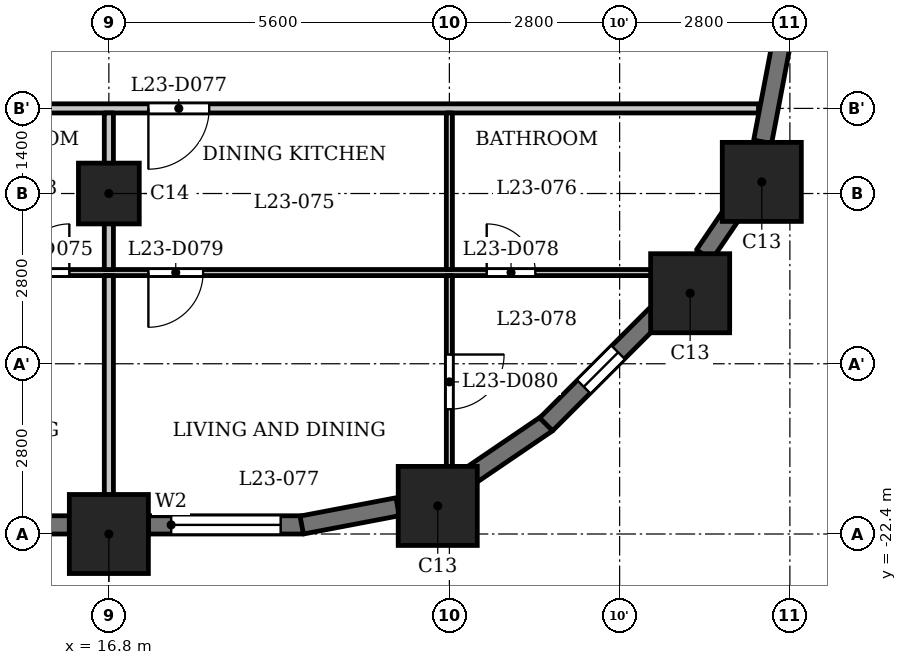
"""IFC4 building model, lengths in metres.
Left out: names, types, materials, properties, quantities, classifications, styles, units other than length and angle.
Written with IfcOpenShell. Run it as: python <this file> out.ifc"""

import sys

from ifc_helpers import new_model, si_unit, direction, frame, frame_2d, origin, origin_2d, place, context, subcontext, project, spatial, rectangle, extrude, element, fill, save


model = new_model("IFC4")
c1 = context("Model", 3, precision=1e-05, world=origin(), true_north=direction((0.0, 1.0)))
c2 = subcontext(c1, "Body", "Model", "MODEL_VIEW")
j1 = project(units=[si_unit("LENGTHUNIT", "METRE"), si_unit("PLANEANGLEUNIT", "RADIAN")], contexts=[c1])
p1 = place(None, origin())
s1 = spatial("IfcSite", under=j1, at=p1, CompositionType="ELEMENT")
p2 = place(p1, origin())
s2 = spatial("IfcBuilding", under=s1, at=p2, CompositionType="ELEMENT")
p3 = place(p2, frame((0.0, 0.0, 93.8)))
s3 = spatial("IfcBuildingStorey", under=s2, at=p3, CompositionType="ELEMENT", Elevation=93.8)
for number, where, z_axis, x_axis in (
    (1, (16.8, -22.4, 0.0), (0.0, 0.0, 1.0), (1.0, 0.0, 0.0)),
    (2, (22.209, -21.938, 0.0), (0.0, 0.0, 1.0), (1.0, 0.0, 0.0)),
    (3, (26.36, -18.44, 0.0), (0.0, 0.0, 1.0), (1.0, 0.0, 0.0)),
    (4, (27.538, -16.609, 0.0), (0.0, 0.0, 1.0), (1.0, 0.0, 0.0)),
):
    element("IfcColumn", number, at=place(p3, frame(where, z_axis=z_axis, x_axis=x_axis)), inside=s3, PredefinedType="COLUMN", context=c2, shape_type="SweptSolid", body=[
        extrude(rectangle(XDim=1.3, YDim=1.3, at=origin_2d()), origin(), (0.0, 0.0, 1.0), 3.5),
    ])
p4 = place(p3, frame((16.8, -16.8, 0.0), z_axis=(0.0, 0.0, 1.0), x_axis=(1.0, 0.0, 0.0)))
e5 = element("IfcColumn", 5, at=p4, inside=s3, PredefinedType="COLUMN", context=c2, shape_type="SweptSolid", body=[
    extrude(rectangle(XDim=1.0, YDim=1.0, at=origin_2d()), origin(), (0.0, 0.0, 1.0), 3.5),
])
p5 = place(p3, frame((11.85, -22.25, 0.0), z_axis=(0.0, 0.0, 1.0), x_axis=(1.0, 0.0, 0.0)))
e6 = element("IfcWall", 6, at=p5, inside=s3, PredefinedType="SOLIDWALL", context=c2, shape_type="SweptSolid", body=[
    extrude(rectangle(XDim=4.3, YDim=0.3, at=frame_2d((2.15, 0.0))), origin(), (0.0, 0.0, 1.0), 2.4),
])
p6 = place(p5, frame((0.35, 0.0, 1.2)))
e7 = element("IfcOpeningElement", 7, at=p6, cuts=e6, PredefinedType="OPENING", context=c2, shape_type="SweptSolid", body=[
    extrude(rectangle(XDim=3.6, YDim=0.95, at=frame_2d((1.8, 0.475))), frame((0.0, 0.16, 0.0), z_axis=(0.0, -1.0, 0.0), x_axis=(1.0, 0.0, 0.0)), (0.0, 0.0, 1.0), 0.32),
])
p7 = place(p3, frame((17.45, -22.25, 0.0), z_axis=(0.0, 0.0, 1.0), x_axis=(1.0, 0.0, 0.0)))
e8 = element("IfcWall", 8, at=p7, inside=s3, PredefinedType="SOLIDWALL", context=c2, shape_type="SweptSolid", body=[
    extrude(rectangle(XDim=2.55, YDim=0.3, at=frame_2d((1.275, 0.0))), origin(), (0.0, 0.0, 1.0), 2.4),
])
p8 = place(p7, frame((0.375, 0.0, 0.9)))
e9 = element("IfcOpeningElement", 9, at=p8, cuts=e8, PredefinedType="OPENING", context=c2, shape_type="SweptSolid", body=[
    extrude(rectangle(XDim=1.8, YDim=1.25, at=frame_2d((0.9, 0.625))), frame((0.0, 0.16, 0.0), z_axis=(0.0, -1.0, 0.0), x_axis=(1.0, 0.0, 0.0)), (0.0, 0.0, 1.0), 0.32),
])
for number, where, z_axis, x_axis in (
    (10, (19.972, -22.253, 0.0), (0.0, 0.0, 1.0), (0.982, 0.187, 0.0)),
    (11, (22.684, -21.482, 0.0), (0.0, 0.0, 1.0), (0.827, 0.562, 0.0)),
):
    element("IfcWall", number, at=place(p3, frame(where, z_axis=z_axis, x_axis=x_axis)), inside=s3, PredefinedType="SOLIDWALL", context=c2, shape_type="SweptSolid", body=[
        extrude(rectangle(XDim=1.606, YDim=0.3, at=frame_2d((0.803, 0.0))), origin(), (0.0, 0.0, 1.0), 2.4),
    ])
p9 = place(p3, frame((23.991, -20.597, 0.0), z_axis=(0.0, 0.0, 1.0), x_axis=(0.707106781187, 0.707106781187, 0.0)))
e12 = element("IfcWall", 12, at=p9, inside=s3, PredefinedType="SOLIDWALL", context=c2, shape_type="SweptSolid", body=[
    extrude(rectangle(XDim=2.55, YDim=0.3, at=frame_2d((1.275, 0.0))), origin(), (0.0, 0.0, 1.0), 2.4),
])
p10 = place(p9, frame((0.875, 0.0, 0.6)))
e13 = element("IfcOpeningElement", 13, at=p10, cuts=e12, PredefinedType="OPENING", context=c2, shape_type="SweptSolid", body=[
    extrude(rectangle(XDim=0.8, YDim=1.55, at=frame_2d((0.4, 0.775))), frame((0.0, 0.16, 0.0), z_axis=(0.0, -1.0, 0.0), x_axis=(1.0, 0.0, 0.0)), (0.0, 0.0, 1.0), 0.32),
])
p11 = place(p3, frame((26.589, -17.81, 0.0), z_axis=(0.0, 0.0, 1.0), x_axis=(0.562066330934, 0.827092159091, 0.0)))
e14 = element("IfcWall", 14, at=p11, inside=s3, PredefinedType="SOLIDWALL", context=c2, shape_type="SweptSolid", body=[
    extrude(rectangle(XDim=0.877, YDim=0.3, at=frame_2d((0.438, 0.0))), origin(), (0.0, 0.0, 1.0), 3.2),
])
p12 = place(p3, frame((27.552, -15.949, 0.0), z_axis=(0.0, 0.0, 1.0), x_axis=(0.187279751651, 0.982306619453, 0.0)))
e15 = element("IfcWall", 15, at=p12, inside=s3, PredefinedType="SOLIDWALL", context=c2, shape_type="SweptSolid", body=[
    extrude(rectangle(XDim=1.606, YDim=0.3, at=frame_2d((0.803, 0.0))), origin(), (0.0, 0.0, 1.0), 2.4),
])
p13 = place(p3, frame((-26.19, -18.1, 0.0), z_axis=(0.0, 0.0, 1.0), x_axis=(1.0, 0.0, 0.0)))
e16 = element("IfcWall", 16, at=p13, inside=s3, PredefinedType="PARTITIONING", context=c2, shape_type="SweptSolid", body=[
    extrude(rectangle(XDim=52.63, YDim=0.1, at=frame_2d((26.315, 0.0))), origin(), (0.0, 0.0, 1.0), 3.2),
])
p14 = place(p13, frame((1.09, 0.0, 0.0)))
e17 = element("IfcOpeningElement", 17, at=p14, cuts=e16, PredefinedType="OPENING", context=c2, shape_type="SweptSolid", body=[
    extrude(rectangle(XDim=0.8, YDim=2.1, at=frame_2d((0.4, 1.05))), frame((0.0, 0.06, 0.0), z_axis=(0.0, -1.0, 0.0), x_axis=(1.0, 0.0, 0.0)), (0.0, 0.0, 1.0), 0.12),
])
p15 = place(p13, frame((4.44, 0.0, 0.0)))
e18 = element("IfcOpeningElement", 18, at=p15, cuts=e16, PredefinedType="OPENING", context=c2, shape_type="SweptSolid", body=[
    extrude(rectangle(XDim=0.9, YDim=2.1, at=frame_2d((0.45, 1.05))), frame((0.0, 0.06, 0.0), z_axis=(0.0, -1.0, 0.0), x_axis=(1.0, 0.0, 0.0)), (0.0, 0.0, 1.0), 0.12),
])
p16 = place(p13, frame((10.04, 0.0, 0.0)))
e19 = element("IfcOpeningElement", 19, at=p16, cuts=e16, PredefinedType="OPENING", context=c2, shape_type="SweptSolid", body=[
    extrude(rectangle(XDim=0.8, YDim=2.1, at=frame_2d((0.4, 1.05))), frame((0.0, 0.06, 0.0), z_axis=(0.0, -1.0, 0.0), x_axis=(1.0, 0.0, 0.0)), (0.0, 0.0, 1.0), 0.12),
])
p17 = place(p13, frame((15.64, 0.0, 0.0)))
e20 = element("IfcOpeningElement", 20, at=p17, cuts=e16, PredefinedType="OPENING", context=c2, shape_type="SweptSolid", body=[
    extrude(rectangle(XDim=0.9, YDim=2.1, at=frame_2d((0.45, 1.05))), frame((0.0, 0.06, 0.0), z_axis=(0.0, -1.0, 0.0), x_axis=(1.0, 0.0, 0.0)), (0.0, 0.0, 1.0), 0.12),
])
p18 = place(p13, frame((24.74, 0.0, 0.0)))
e21 = element("IfcOpeningElement", 21, at=p18, cuts=e16, PredefinedType="OPENING", context=c2, shape_type="SweptSolid", body=[
    extrude(rectangle(XDim=0.8, YDim=2.1, at=frame_2d((0.4, 1.05))), frame((0.0, 0.06, 0.0), z_axis=(0.0, -1.0, 0.0), x_axis=(1.0, 0.0, 0.0)), (0.0, 0.0, 1.0), 0.12),
])
p19 = place(p13, frame((21.24, 0.0, 0.0)))
e22 = element("IfcOpeningElement", 22, at=p19, cuts=e16, PredefinedType="OPENING", context=c2, shape_type="SweptSolid", body=[
    extrude(rectangle(XDim=0.9, YDim=2.1, at=frame_2d((0.45, 1.05))), frame((0.0, 0.06, 0.0), z_axis=(0.0, -1.0, 0.0), x_axis=(1.0, 0.0, 0.0)), (0.0, 0.0, 1.0), 0.12),
])
p20 = place(p13, frame((35.94, 0.0, 0.0)))
e23 = element("IfcOpeningElement", 23, at=p20, cuts=e16, PredefinedType="OPENING", context=c2, shape_type="SweptSolid", body=[
    extrude(rectangle(XDim=0.8, YDim=2.1, at=frame_2d((0.4, 1.05))), frame((0.0, 0.06, 0.0), z_axis=(0.0, -1.0, 0.0), x_axis=(1.0, 0.0, 0.0)), (0.0, 0.0, 1.0), 0.12),
])
p21 = place(p13, frame((33.19, 0.0, 0.0)))
e24 = element("IfcOpeningElement", 24, at=p21, cuts=e16, PredefinedType="OPENING", context=c2, shape_type="SweptSolid", body=[
    extrude(rectangle(XDim=0.9, YDim=2.1, at=frame_2d((0.45, 1.05))), frame((0.0, 0.06, 0.0), z_axis=(0.0, -1.0, 0.0), x_axis=(1.0, 0.0, 0.0)), (0.0, 0.0, 1.0), 0.12),
])
p22 = place(p13, frame((27.59, 0.0, 0.0)))
e25 = element("IfcOpeningElement", 25, at=p22, cuts=e16, PredefinedType="OPENING", context=c2, shape_type="SweptSolid", body=[
    extrude(rectangle(XDim=0.9, YDim=2.1, at=frame_2d((0.45, 1.05))), frame((0.0, 0.06, 0.0), z_axis=(0.0, -1.0, 0.0), x_axis=(1.0, 0.0, 0.0)), (0.0, 0.0, 1.0), 0.12),
])
p23 = place(p13, frame((29.64, 0.0, 0.0)))
e26 = element("IfcOpeningElement", 26, at=p23, cuts=e16, PredefinedType="OPENING", context=c2, shape_type="SweptSolid", body=[
    extrude(rectangle(XDim=0.9, YDim=2.1, at=frame_2d((0.45, 1.05))), frame((0.0, 0.06, 0.0), z_axis=(0.0, -1.0, 0.0), x_axis=(1.0, 0.0, 0.0)), (0.0, 0.0, 1.0), 0.12),
])
p24 = place(p13, frame((41.54, 0.0, 0.0)))
e27 = element("IfcOpeningElement", 27, at=p24, cuts=e16, PredefinedType="OPENING", context=c2, shape_type="SweptSolid", body=[
    extrude(rectangle(XDim=0.8, YDim=2.1, at=frame_2d((0.4, 1.05))), frame((0.0, 0.06, 0.0), z_axis=(0.0, -1.0, 0.0), x_axis=(1.0, 0.0, 0.0)), (0.0, 0.0, 1.0), 0.12),
])
p25 = place(p13, frame((38.54, 0.0, 0.0)))
e28 = element("IfcOpeningElement", 28, at=p25, cuts=e16, PredefinedType="OPENING", context=c2, shape_type="SweptSolid", body=[
    extrude(rectangle(XDim=0.9, YDim=2.1, at=frame_2d((0.45, 1.05))), frame((0.0, 0.06, 0.0), z_axis=(0.0, -1.0, 0.0), x_axis=(1.0, 0.0, 0.0)), (0.0, 0.0, 1.0), 0.12),
])
p26 = place(p13, frame((49.204, 0.0, 0.0)))
e29 = element("IfcOpeningElement", 29, at=p26, cuts=e16, PredefinedType="OPENING", context=c2, shape_type="SweptSolid", body=[
    extrude(rectangle(XDim=0.8, YDim=2.1, at=frame_2d((0.4, 1.05))), frame((0.0, 0.06, 0.0), z_axis=(0.0, -1.0, 0.0), x_axis=(1.0, 0.0, 0.0)), (0.0, 0.0, 1.0), 0.12),
])
p27 = place(p13, frame((43.64, 0.0, 0.0)))
e30 = element("IfcOpeningElement", 30, at=p27, cuts=e16, PredefinedType="OPENING", context=c2, shape_type="SweptSolid", body=[
    extrude(rectangle(XDim=0.9, YDim=2.1, at=frame_2d((0.45, 1.05))), frame((0.0, 0.06, 0.0), z_axis=(0.0, -1.0, 0.0), x_axis=(1.0, 0.0, 0.0)), (0.0, 0.0, 1.0), 0.12),
])
p28 = place(p3, frame((-27.484, -15.4, 0.0), z_axis=(0.0, 0.0, 1.0), x_axis=(1.0, 0.0, 0.0)))
e31 = element("IfcWall", 31, at=p28, inside=s3, PredefinedType="PARTITIONING", context=c2, shape_type="SweptSolid", body=[
    extrude(rectangle(XDim=54.968, YDim=0.15, at=frame_2d((27.484, 0.0))), origin(), (0.0, 0.0, 1.0), 3.2),
])
p29 = place(p28, frame((5.734, 0.0, 0.0)))
e32 = element("IfcOpeningElement", 32, at=p29, cuts=e31, PredefinedType="OPENING", context=c2, shape_type="SweptSolid", body=[
    extrude(rectangle(XDim=1.0, YDim=2.1, at=frame_2d((0.5, 1.05))), frame((0.0, 0.085, 0.0), z_axis=(0.0, -1.0, 0.0), x_axis=(1.0, 0.0, 0.0)), (0.0, 0.0, 1.0), 0.17),
])
p30 = place(p28, frame((16.934, 0.0, 0.0)))
e33 = element("IfcOpeningElement", 33, at=p30, cuts=e31, PredefinedType="OPENING", context=c2, shape_type="SweptSolid", body=[
    extrude(rectangle(XDim=1.0, YDim=2.1, at=frame_2d((0.5, 1.05))), frame((0.0, 0.085, 0.0), z_axis=(0.0, -1.0, 0.0), x_axis=(1.0, 0.0, 0.0)), (0.0, 0.0, 1.0), 0.17),
])
p31 = place(p28, frame((22.534, 0.0, 0.0)))
e34 = element("IfcOpeningElement", 34, at=p31, cuts=e31, PredefinedType="OPENING", context=c2, shape_type="SweptSolid", body=[
    extrude(rectangle(XDim=1.0, YDim=2.1, at=frame_2d((0.5, 1.05))), frame((0.0, 0.085, 0.0), z_axis=(0.0, -1.0, 0.0), x_axis=(1.0, 0.0, 0.0)), (0.0, 0.0, 1.0), 0.17),
])
p32 = place(p28, frame((31.384, 0.0, 0.0)))
e35 = element("IfcOpeningElement", 35, at=p32, cuts=e31, PredefinedType="OPENING", context=c2, shape_type="SweptSolid", body=[
    extrude(rectangle(XDim=1.0, YDim=2.1, at=frame_2d((0.5, 1.05))), frame((0.0, 0.085, 0.0), z_axis=(0.0, -1.0, 0.0), x_axis=(1.0, 0.0, 0.0)), (0.0, 0.0, 1.0), 0.17),
])
p33 = place(p28, frame((39.584, 0.0, 0.0)))
e36 = element("IfcOpeningElement", 36, at=p33, cuts=e31, PredefinedType="OPENING", context=c2, shape_type="SweptSolid", body=[
    extrude(rectangle(XDim=1.0, YDim=2.1, at=frame_2d((0.5, 1.05))), frame((0.0, 0.085, 0.0), z_axis=(0.0, -1.0, 0.0), x_axis=(1.0, 0.0, 0.0)), (0.0, 0.0, 1.0), 0.17),
])
p34 = place(p28, frame((44.934, 0.0, 0.0)))
e37 = element("IfcOpeningElement", 37, at=p34, cuts=e31, PredefinedType="OPENING", context=c2, shape_type="SweptSolid", body=[
    extrude(rectangle(XDim=1.0, YDim=2.1, at=frame_2d((0.5, 1.05))), frame((0.0, 0.085, 0.0), z_axis=(0.0, -1.0, 0.0), x_axis=(1.0, 0.0, 0.0)), (0.0, 0.0, 1.0), 0.17),
])
p35 = place(p3, frame((16.8, -23.03, 0.0), z_axis=(0.0, 0.0, 1.0), x_axis=(0.0, 1.0, 0.0)))
e38 = element("IfcWall", 38, at=p35, inside=s3, PredefinedType="PARTITIONING", context=c2, shape_type="SweptSolid", body=[
    extrude(rectangle(XDim=4.88, YDim=0.15, at=frame_2d((2.44, 0.0))), origin(), (0.0, 0.0, 1.0), 3.2),
])
p36 = place(p3, frame((16.8, -18.05, 0.0), z_axis=(0.0, 0.0, 1.0), x_axis=(0.0, 1.0, 0.0)))
e39 = element("IfcWall", 39, at=p36, inside=s3, PredefinedType="PARTITIONING", context=c2, shape_type="SweptSolid", body=[
    extrude(rectangle(XDim=2.575, YDim=0.15, at=frame_2d((1.288, 0.0))), origin(), (0.0, 0.0, 1.0), 3.2),
])
p37 = place(p3, frame((22.4, -21.72, 0.0), z_axis=(0.0, 0.0, 1.0), x_axis=(0.0, 1.0, 0.0)))
e40 = element("IfcWall", 40, at=p37, inside=s3, PredefinedType="PARTITIONING", context=c2, shape_type="SweptSolid", body=[
    extrude(rectangle(XDim=3.57, YDim=0.1, at=frame_2d((1.785, 0.0))), origin(), (0.0, 0.0, 1.0), 3.2),
])
p38 = place(p37, frame((1.372, 0.0, 0.0)))
e41 = element("IfcOpeningElement", 41, at=p38, cuts=e40, PredefinedType="OPENING", context=c2, shape_type="SweptSolid", body=[
    extrude(rectangle(XDim=0.9, YDim=2.1, at=frame_2d((0.45, 1.05))), frame((0.0, 0.06, 0.0), z_axis=(0.0, -1.0, 0.0), x_axis=(1.0, 0.0, 0.0)), (0.0, 0.0, 1.0), 0.12),
])
p39 = place(p3, frame((22.4, -18.05, 0.0), z_axis=(0.0, 0.0, 1.0), x_axis=(0.0, 1.0, 0.0)))
e42 = element("IfcWall", 42, at=p39, inside=s3, PredefinedType="PARTITIONING", context=c2, shape_type="SweptSolid", body=[
    extrude(rectangle(XDim=2.575, YDim=0.1, at=frame_2d((1.288, 0.0))), origin(), (0.0, 0.0, 1.0), 3.2),
])
p40 = place(p24, origin())
e43 = element("IfcDoor", 43, at=p40, inside=s3, OperationType="SINGLE_SWING_LEFT", PredefinedType="DOOR", context=c2, shape_type="SweptSolid", body=[
    extrude(rectangle(XDim=0.8, YDim=2.1, at=frame_2d((0.4, 1.05))), frame((0.0, 0.025, 0.0), z_axis=(0.0, -1.0, 0.0), x_axis=(1.0, 0.0, 0.0)), (0.0, 0.0, 1.0), 0.05),
])
fill(e27, e43)
p41 = place(p34, origin())
e44 = element("IfcDoor", 44, at=p41, inside=s3, OperationType="SINGLE_SWING_LEFT", PredefinedType="DOOR", context=c2, shape_type="SweptSolid", body=[
    extrude(rectangle(XDim=1.0, YDim=2.1, at=frame_2d((0.5, 1.05))), frame((0.0, 0.025, 0.0), z_axis=(0.0, -1.0, 0.0), x_axis=(1.0, 0.0, 0.0)), (0.0, 0.0, 1.0), 0.05),
])
fill(e37, e44)
p42 = place(p26, origin())
e45 = element("IfcDoor", 45, at=p42, inside=s3, OperationType="SINGLE_SWING_RIGHT", PredefinedType="DOOR", context=c2, shape_type="SweptSolid", body=[
    extrude(rectangle(XDim=0.8, YDim=2.1, at=frame_2d((0.4, 1.05))), frame((0.0, 0.025, 0.0), z_axis=(0.0, -1.0, 0.0), x_axis=(1.0, 0.0, 0.0)), (0.0, 0.0, 1.0), 0.05),
])
fill(e29, e45)
p43 = place(p27, origin())
e46 = element("IfcDoor", 46, at=p43, inside=s3, OperationType="SINGLE_SWING_LEFT", PredefinedType="DOOR", context=c2, shape_type="SweptSolid", body=[
    extrude(rectangle(XDim=0.9, YDim=2.1, at=frame_2d((0.45, 1.05))), frame((0.0, 0.025, 0.0), z_axis=(0.0, -1.0, 0.0), x_axis=(1.0, 0.0, 0.0)), (0.0, 0.0, 1.0), 0.05),
])
fill(e30, e46)
p44 = place(p38, origin())
e47 = element("IfcDoor", 47, at=p44, inside=s3, OperationType="SINGLE_SWING_RIGHT", PredefinedType="DOOR", context=c2, shape_type="SweptSolid", body=[
    extrude(rectangle(XDim=0.9, YDim=2.1, at=frame_2d((0.45, 1.05))), frame((0.0, 0.025, 0.0), z_axis=(0.0, -1.0, 0.0), x_axis=(1.0, 0.0, 0.0)), (0.0, 0.0, 1.0), 0.05),
])
fill(e41, e47)
p45 = place(p8, origin())
e48 = element("IfcWindow", 48, at=p45, inside=s3, PartitioningType="SINGLE_PANEL", PredefinedType="WINDOW", context=c2, shape_type="SweptSolid", body=[
    extrude(rectangle(XDim=1.8, YDim=1.25, at=frame_2d((0.9, 0.625))), frame((0.0, 0.03, 0.0), z_axis=(0.0, -1.0, 0.0), x_axis=(1.0, 0.0, 0.0)), (0.0, 0.0, 1.0), 0.06),
])
fill(e9, e48)
p46 = place(p10, origin())
e49 = element("IfcWindow", 49, at=p46, inside=s3, PartitioningType="SINGLE_PANEL", PredefinedType="WINDOW", context=c2, shape_type="SweptSolid", body=[
    extrude(rectangle(XDim=0.8, YDim=1.55, at=frame_2d((0.4, 0.775))), frame((0.0, 0.03, 0.0), z_axis=(0.0, -1.0, 0.0), x_axis=(1.0, 0.0, 0.0)), (0.0, 0.0, 1.0), 0.06),
])
fill(e13, e49)
save(model, sys.argv[1])
